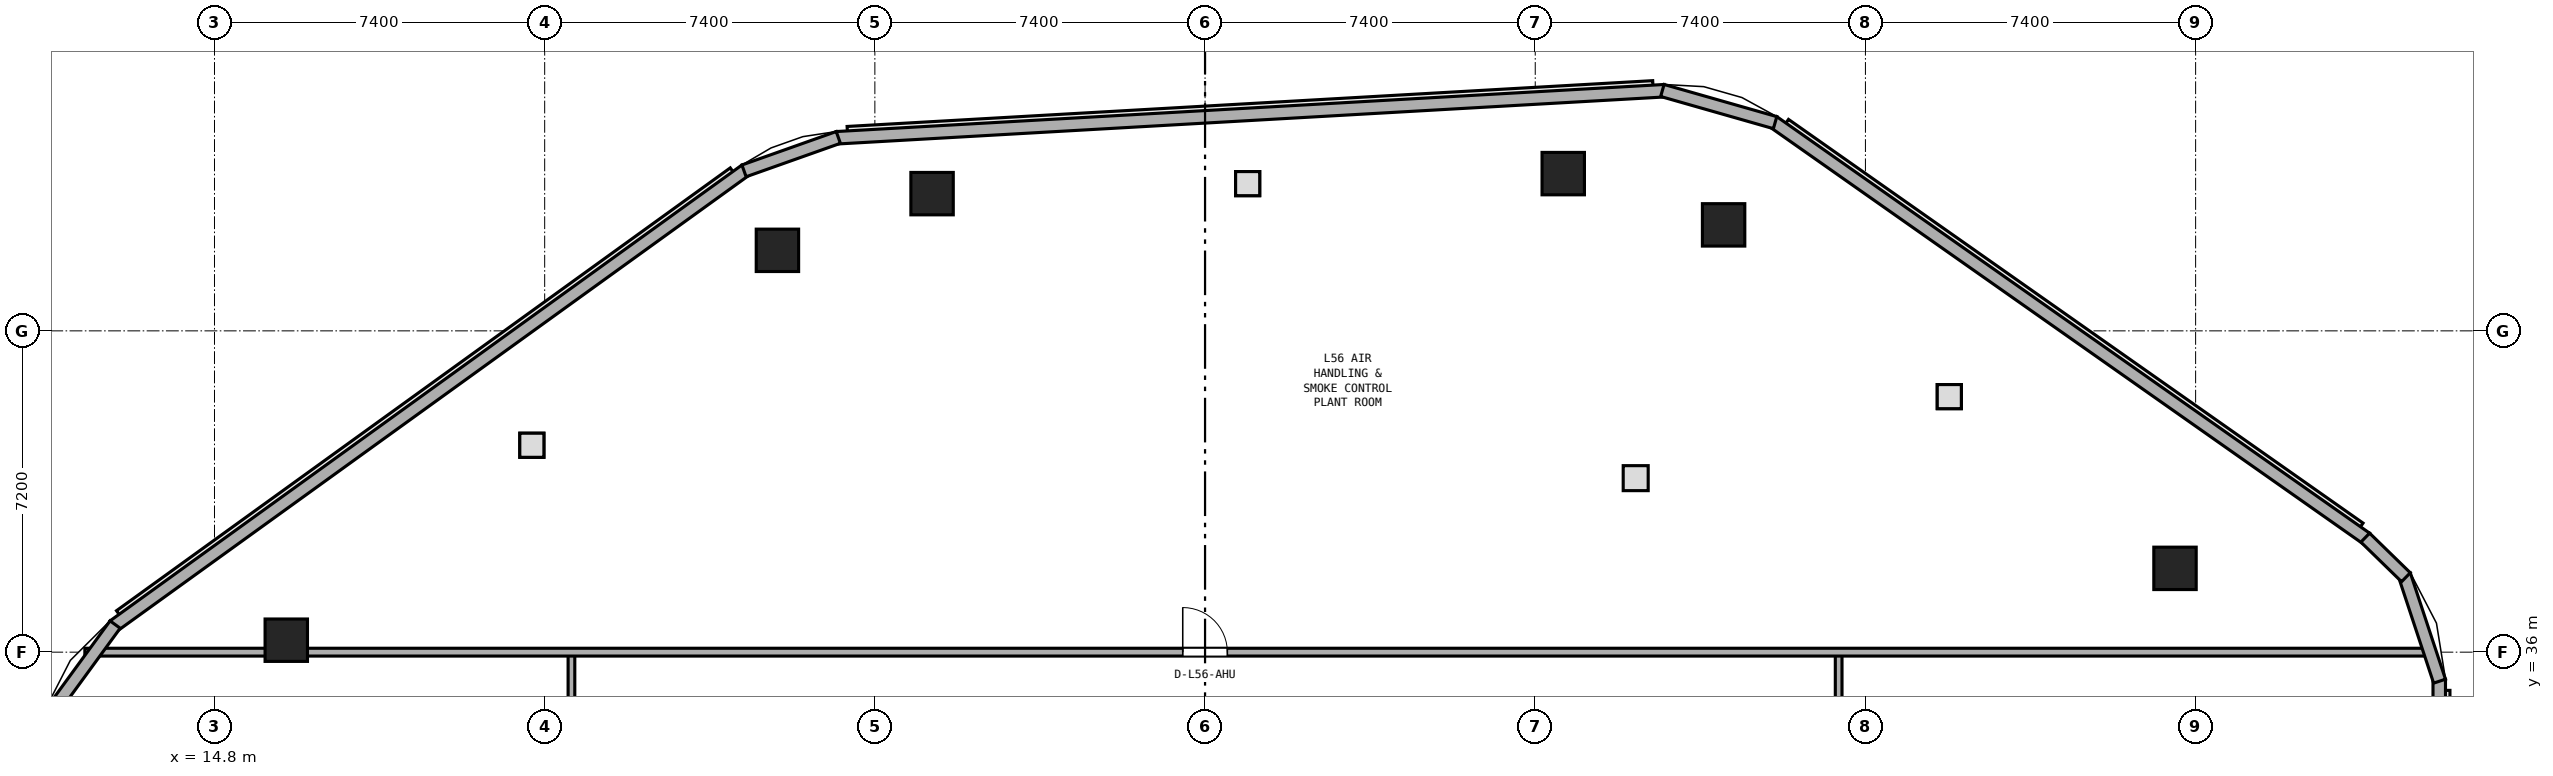
"""IFC4 building model, lengths in metres.
Left out: names, types, materials, properties, quantities, classifications, styles, units other than length and angle.
Written with IfcOpenShell. Run it as: python <this file> out.ifc"""

import sys

from ifc_helpers import new_model, si_unit, direction, frame, frame_2d, origin, origin_2d, place, context, subcontext, project, spatial, rectangle, extrude, element, fill, save


model = new_model("IFC4")
c1 = context("Model", 3, precision=1e-05, world=origin(), true_north=direction((0.0, 1.0)))
c2 = subcontext(c1, "Body", "Model", "MODEL_VIEW")
j1 = project(units=[si_unit("LENGTHUNIT", "METRE"), si_unit("PLANEANGLEUNIT", "RADIAN")], contexts=[c1])
p1 = place(None, origin())
s1 = spatial("IfcSite", under=j1, at=p1, CompositionType="ELEMENT")
p2 = place(p1, origin())
s2 = spatial("IfcBuilding", under=s1, at=p2, CompositionType="ELEMENT")
p3 = place(p2, frame((0.0, 0.0, 220.0)))
s3 = spatial("IfcBuildingStorey", under=s2, at=p3, CompositionType="ELEMENT", Elevation=220.0)
for number, where, z_axis, x_axis in (
    (1, (58.738, 37.878, 0.0), (0.0, 0.0, 1.0), (1.0, 0.0, 0.0)),
    (2, (48.622, 45.575, 0.0), (0.0, 0.0, 1.0), (1.0, 0.0, 0.0)),
    (3, (45.028, 46.724, 0.0), (0.0, 0.0, 1.0), (1.0, 0.0, 0.0)),
    (4, (30.882, 46.275, 0.0), (0.0, 0.0, 1.0), (1.0, 0.0, 0.0)),
    (5, (27.416, 45.004, 0.0), (0.0, 0.0, 1.0), (1.0, 0.0, 0.0)),
    (6, (16.409, 36.268, 0.0), (0.0, 0.0, 1.0), (1.0, 0.0, 0.0)),
):
    element("IfcColumn", number, at=place(p3, frame(where, z_axis=z_axis, x_axis=x_axis)), inside=s3, PredefinedType="COLUMN", context=c2, shape_type="SweptSolid", body=[
        extrude(rectangle(XDim=0.95, YDim=0.95, at=origin_2d()), origin(), (0.0, 0.0, 1.0), 5.0),
    ])
p4 = place(p3, frame((51.2, 14.4, 0.0), z_axis=(0.0, 0.0, 1.0), x_axis=(0.0, 1.0, 0.0)))
e7 = element("IfcWall", 7, at=p4, inside=s3, PredefinedType="PARTITIONING", context=c2, shape_type="SweptSolid", body=[
    extrude(rectangle(XDim=21.6, YDim=0.15, at=frame_2d((10.8, 0.0))), origin(), (0.0, 0.0, 1.0), 4.71),
])
p5 = place(p4, frame((10.2, 0.0, 0.0)))
e8 = element("IfcOpeningElement", 8, at=p5, cuts=e7, PredefinedType="OPENING", context=c2, shape_type="SweptSolid", body=[
    extrude(rectangle(XDim=1.2, YDim=2.15, at=frame_2d((0.6, 1.075))), frame((0.0, 0.085, 0.0), z_axis=(0.0, -1.0, 0.0), x_axis=(1.0, 0.0, 0.0)), (0.0, 0.0, 1.0), 0.17),
])
p6 = place(p3, frame((22.8, 14.4, 0.0), z_axis=(0.0, 0.0, 1.0), x_axis=(0.0, 1.0, 0.0)))
e9 = element("IfcWall", 9, at=p6, inside=s3, PredefinedType="PARTITIONING", context=c2, shape_type="SweptSolid", body=[
    extrude(rectangle(XDim=21.6, YDim=0.15, at=frame_2d((10.8, 0.0))), origin(), (0.0, 0.0, 1.0), 4.71),
])
p7 = place(p6, frame((10.3, 0.0, 0.0)))
e10 = element("IfcOpeningElement", 10, at=p7, cuts=e9, PredefinedType="OPENING", context=c2, shape_type="SweptSolid", body=[
    extrude(rectangle(XDim=1.0, YDim=2.04, at=frame_2d((0.5, 1.02))), frame((0.0, 0.085, 0.0), z_axis=(0.0, -1.0, 0.0), x_axis=(1.0, 0.0, 0.0)), (0.0, 0.0, 1.0), 0.17),
])
p8 = place(p3, frame((11.895, 36.0, 0.0), z_axis=(0.0, 0.0, 1.0), x_axis=(1.0, 0.0, 0.0)))
e11 = element("IfcWall", 11, at=p8, inside=s3, PredefinedType="PARTITIONING", context=c2, shape_type="SweptSolid", body=[
    extrude(rectangle(XDim=52.603, YDim=0.175, at=frame_2d((26.301, 0.0))), origin(), (0.0, 0.0, 1.0), 2.31),
])
p9 = place(p8, frame((24.605, 0.0, 0.0)))
e12 = element("IfcOpeningElement", 12, at=p9, cuts=e11, PredefinedType="OPENING", context=c2, shape_type="SweptSolid", body=[
    extrude(rectangle(XDim=1.0, YDim=2.04, at=frame_2d((0.5, 1.02))), frame((0.0, 0.097, 0.0), z_axis=(0.0, -1.0, 0.0), x_axis=(1.0, 0.0, 0.0)), (0.0, 0.0, 1.0), 0.195),
])
p10 = place(p3, frame((64.66, 16.281, 0.0), z_axis=(0.0, 0.0, 1.0), x_axis=(0.0, 1.0, 0.0)))
e13 = element("IfcWall", 13, at=p10, inside=s3, PredefinedType="STANDARD", context=c2, shape_type="SweptSolid", body=[
    extrude(rectangle(XDim=19.113, YDim=0.28, at=frame_2d((9.556, 0.0))), origin(), (0.0, 0.0, 1.0), 2.31),
])
p11 = place(p3, frame((63.019, 38.552, 0.0), z_axis=(0.0, 0.0, 1.0), x_axis=(-0.818245985693, 0.574868251774, 0.0)))
e14 = element("IfcWall", 14, at=p11, inside=s3, PredefinedType="STANDARD", context=c2, shape_type="SweptSolid", body=[
    extrude(rectangle(XDim=16.237, YDim=0.28, at=frame_2d((8.118, 0.0))), origin(), (0.0, 0.0, 1.0), 2.31),
])
p12 = place(p3, frame((47.295, 48.581, 0.0), z_axis=(0.0, 0.0, 1.0), x_axis=(-0.998388180282, -0.056754219867, 0.0)))
e15 = element("IfcWall", 15, at=p12, inside=s3, PredefinedType="STANDARD", context=c2, shape_type="SweptSolid", body=[
    extrude(rectangle(XDim=18.583, YDim=0.28, at=frame_2d((9.292, 0.0))), origin(), (0.0, 0.0, 1.0), 4.71),
])
p13 = place(p3, frame((26.703, 46.803, 0.0), z_axis=(0.0, 0.0, 1.0), x_axis=(-0.811009447916, -0.585033054956, 0.0)))
e16 = element("IfcWall", 16, at=p13, inside=s3, PredefinedType="STANDARD", context=c2, shape_type="SweptSolid", body=[
    extrude(rectangle(XDim=17.461, YDim=0.28, at=frame_2d((8.73, 0.0))), origin(), (0.0, 0.0, 1.0), 4.71),
])
p14 = place(p3, frame((64.667, 35.35, 0.0), z_axis=(0.0, 0.0, 1.0), x_axis=(-0.313953102685, 0.949438491591, 0.0)))
e17 = element("IfcWall", 17, at=p14, inside=s3, PredefinedType="STANDARD", context=c2, shape_type="SweptSolid", body=[
    extrude(rectangle(XDim=2.512, YDim=0.28, at=frame_2d((1.256, 0.0))), origin(), (0.0, 0.0, 1.0), 4.71),
])
p15 = place(p3, frame((63.913, 37.679, 0.0), z_axis=(0.0, 0.0, 1.0), x_axis=(-0.716445950439, 0.697642601981, 0.0)))
e18 = element("IfcWall", 18, at=p15, inside=s3, PredefinedType="STANDARD", context=c2, shape_type="SweptSolid", body=[
    extrude(rectangle(XDim=1.272, YDim=0.28, at=frame_2d((0.636, 0.0))), origin(), (0.0, 0.0, 1.0), 4.71),
])
p16 = place(p3, frame((49.776, 47.866, 0.0), z_axis=(0.0, 0.0, 1.0), x_axis=(-0.96166758475, 0.274217899565, 0.0)))
e19 = element("IfcWall", 19, at=p16, inside=s3, PredefinedType="STANDARD", context=c2, shape_type="SweptSolid", body=[
    extrude(rectangle(XDim=2.627, YDim=0.28, at=frame_2d((1.314, 0.0))), origin(), (0.0, 0.0, 1.0), 4.71),
])
p17 = place(p3, frame((28.781, 47.534, 0.0), z_axis=(0.0, 0.0, 1.0), x_axis=(-0.94246648564, -0.334300648286, 0.0)))
e20 = element("IfcWall", 20, at=p17, inside=s3, PredefinedType="STANDARD", context=c2, shape_type="SweptSolid", body=[
    extrude(rectangle(XDim=2.242, YDim=0.28, at=frame_2d((1.121, 0.0))), origin(), (0.0, 0.0, 1.0), 4.71),
])
p18 = place(p3, frame((12.573, 36.619, 0.0), z_axis=(0.0, 0.0, 1.0), x_axis=(-0.589604441083, -0.807692146214, 0.0)))
e21 = element("IfcWall", 21, at=p18, inside=s3, PredefinedType="STANDARD", context=c2, shape_type="SweptSolid", body=[
    extrude(rectangle(XDim=2.481, YDim=0.28, at=frame_2d((1.24, 0.0))), origin(), (0.0, 0.0, 1.0), 4.71),
])
p19 = place(p9, origin())
e22 = element("IfcDoor", 22, at=p19, inside=s3, OperationType="SINGLE_SWING_LEFT", PredefinedType="DOOR", context=c2, shape_type="SweptSolid", body=[
    extrude(rectangle(XDim=1.0, YDim=2.04, at=frame_2d((0.5, 1.02))), frame((0.0, 0.025, 0.0), z_axis=(0.0, -1.0, 0.0), x_axis=(1.0, 0.0, 0.0)), (0.0, 0.0, 1.0), 0.05),
])
fill(e12, e22)
save(model, sys.argv[1])
